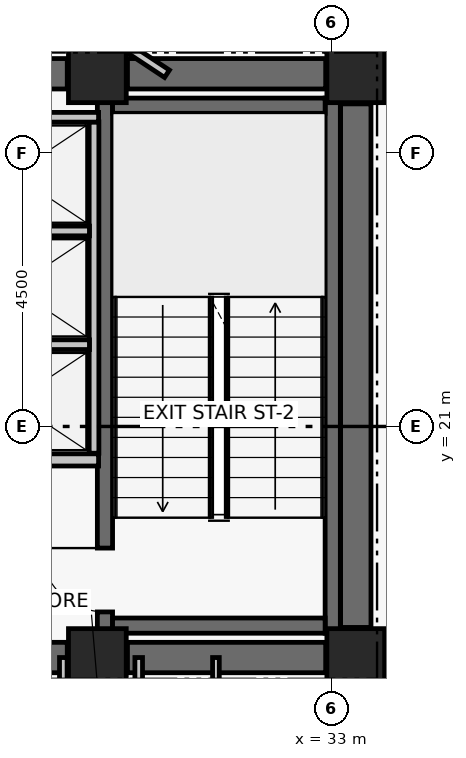
"""IFC4 building model, lengths in metres.
Left out: names, types, materials, properties, quantities, classifications, styles, units other than length and angle.
Written with IfcOpenShell. Run it as: python <this file> out.ifc"""

import sys

from ifc_helpers import new_model, si_unit, direction, frame, frame_2d, origin, origin_2d, place, context, subcontext, project, spatial, rectangle, extrude, element, fill, save


model = new_model("IFC4")
c1 = context("Model", 3, precision=1e-05, world=origin(), true_north=direction((0.0, 1.0)))
c2 = subcontext(c1, "Body", "Model", "MODEL_VIEW")
j1 = project(units=[si_unit("LENGTHUNIT", "METRE"), si_unit("PLANEANGLEUNIT", "RADIAN")], contexts=[c1])
p1 = place(None, origin())
s1 = spatial("IfcSite", under=j1, at=p1, CompositionType="ELEMENT")
p2 = place(p1, origin())
s2 = spatial("IfcBuilding", under=s1, at=p2, CompositionType="ELEMENT")
p3 = place(p2, frame((0.0, 0.0, 195.24)))
s3 = spatial("IfcBuildingStorey", under=s2, at=p3, CompositionType="ELEMENT", Elevation=195.24)
for number, where, z_axis, x_axis in (
    (1, (29.15, 17.2, 0.0), (0.0, 0.0, 1.0), (1.0, 0.0, 0.0)),
    (2, (33.4, 17.2, 0.0), (0.0, 0.0, 1.0), (1.0, 0.0, 0.0)),
    (3, (29.15, 26.8, 0.0), (0.0, 0.0, 1.0), (1.0, 0.0, 0.0)),
    (4, (33.4, 26.8, 0.0), (0.0, 0.0, 1.0), (1.0, 0.0, 0.0)),
):
    element("IfcColumn", number, at=place(p3, frame(where, z_axis=z_axis, x_axis=x_axis)), inside=s3, PredefinedType="COLUMN", context=c2, shape_type="SweptSolid", body=[
        extrude(rectangle(XDim=0.95, YDim=0.95, at=origin_2d()), origin(), (0.0, 0.0, 1.0), 3.72),
    ])
p4 = place(p3, frame((26.85, 17.2, 0.0), z_axis=(0.0, 0.0, 1.0), x_axis=(1.0, 0.0, 0.0)))
e5 = element("IfcWall", 5, at=p4, inside=s3, PredefinedType="SHEAR", context=c2, shape_type="SweptSolid", body=[
    extrude(rectangle(XDim=1.805, YDim=0.5, at=frame_2d((0.902, 0.0))), origin(), (0.0, 0.0, 1.0), 3.5),
])
p5 = place(p3, frame((29.645, 17.2, 0.0), z_axis=(0.0, 0.0, 1.0), x_axis=(1.0, 0.0, 0.0)))
e6 = element("IfcWall", 6, at=p5, inside=s3, PredefinedType="SHEAR", context=c2, shape_type="SweptSolid", body=[
    extrude(rectangle(XDim=3.26, YDim=0.5, at=frame_2d((1.63, 0.0))), origin(), (0.0, 0.0, 1.0), 3.5),
])
p6 = place(p3, frame((26.85, 26.8, 0.0), z_axis=(0.0, 0.0, 1.0), x_axis=(1.0, 0.0, 0.0)))
e7 = element("IfcWall", 7, at=p6, inside=s3, PredefinedType="SHEAR", context=c2, shape_type="SweptSolid", body=[
    extrude(rectangle(XDim=1.805, YDim=0.5, at=frame_2d((0.902, 0.0))), origin(), (0.0, 0.0, 1.0), 3.5),
])
p7 = place(p3, frame((29.645, 26.8, 0.0), z_axis=(0.0, 0.0, 1.0), x_axis=(1.0, 0.0, 0.0)))
e8 = element("IfcWall", 8, at=p7, inside=s3, PredefinedType="SHEAR", context=c2, shape_type="SweptSolid", body=[
    extrude(rectangle(XDim=3.26, YDim=0.5, at=frame_2d((1.63, 0.0))), origin(), (0.0, 0.0, 1.0), 3.5),
])
p8 = place(p3, frame((33.4, 17.695, 0.0), z_axis=(0.0, 0.0, 1.0), x_axis=(0.0, 1.0, 0.0)))
e9 = element("IfcWall", 9, at=p8, inside=s3, PredefinedType="SHEAR", context=c2, shape_type="SweptSolid", body=[
    extrude(rectangle(XDim=8.61, YDim=0.5, at=frame_2d((4.305, 0.0))), origin(), (0.0, 0.0, 1.0), 3.5),
])
p9 = place(p3, frame((29.275, 17.6, 0.0), z_axis=(0.0, 0.0, 1.0), x_axis=(0.0, 1.0, 0.0)))
e10 = element("IfcWall", 10, at=p9, inside=s3, PredefinedType="SHEAR", context=c2, shape_type="SweptSolid", body=[
    extrude(rectangle(XDim=8.8, YDim=0.25, at=frame_2d((4.4, 0.0))), origin(), (0.0, 0.0, 1.0), 3.5),
])
p10 = place(p9, frame((0.35, 0.0, 0.0)))
e11 = element("IfcOpeningElement", 11, at=p10, cuts=e10, PredefinedType="OPENING", context=c2, shape_type="SweptSolid", body=[
    extrude(rectangle(XDim=1.05, YDim=2.08, at=frame_2d((0.525, 1.04))), frame((0.0, 0.135, 0.0), z_axis=(0.0, -1.0, 0.0), x_axis=(1.0, 0.0, 0.0)), (0.0, 0.0, 1.0), 0.27),
])
p11 = place(p3, frame((33.021, 17.6, 0.0), z_axis=(0.0, 0.0, 1.0), x_axis=(0.0, 1.0, 0.0)))
e12 = element("IfcWall", 12, at=p11, inside=s3, PredefinedType="SHEAR", context=c2, shape_type="SweptSolid", body=[
    extrude(rectangle(XDim=8.8, YDim=0.25, at=frame_2d((4.4, 0.0))), origin(), (0.0, 0.0, 1.0), 3.5),
])
for number, where, z_axis, x_axis in (
    (13, (29.4, 17.725, 0.0), (0.0, 0.0, 1.0), (1.0, 0.0, 0.0)),
    (14, (29.4, 26.275, 0.0), (0.0, 0.0, 1.0), (1.0, 0.0, 0.0)),
):
    element("IfcWall", number, at=place(p3, frame(where, z_axis=z_axis, x_axis=x_axis)), inside=s3, PredefinedType="SHEAR", context=c2, shape_type="SweptSolid", body=[
        extrude(rectangle(XDim=3.496, YDim=0.25, at=frame_2d((1.748, 0.0))), origin(), (0.0, 0.0, 1.0), 3.5),
    ])
p12 = place(p3, frame((33.914, 26.649, 0.0), z_axis=(0.0, 0.0, 1.0), x_axis=(0.834259642914, -0.55137178764, 0.0)))
e15 = element("IfcWall", 15, at=p12, inside=s3, PredefinedType="PARTITIONING", context=c2, shape_type="SweptSolid", body=[
    extrude(rectangle(XDim=3.763, YDim=0.26, at=frame_2d((1.881, 0.0))), origin(), (0.0, 0.0, 1.0), 2.93),
])
p13 = place(p3, frame((26.37, 20.45, 0.0), z_axis=(0.0, 0.0, 1.0), x_axis=(1.0, 0.0, 0.0)))
e16 = element("IfcWall", 16, at=p13, inside=s3, PredefinedType="PARTITIONING", context=c2, shape_type="SweptSolid", body=[
    extrude(rectangle(XDim=2.8, YDim=0.2, at=frame_2d((1.4, 0.0))), origin(), (0.0, 0.0, 1.0), 3.5),
])
p14 = place(p13, frame((0.78, 0.0, 0.0)))
e17 = element("IfcOpeningElement", 17, at=p14, cuts=e16, PredefinedType="OPENING", context=c2, shape_type="SweptSolid", body=[
    extrude(rectangle(XDim=1.1, YDim=2.08, at=frame_2d((0.55, 1.04))), frame((0.0, 0.11, 0.0), z_axis=(0.0, -1.0, 0.0), x_axis=(1.0, 0.0, 0.0)), (0.0, 0.0, 1.0), 0.22),
])
p15 = place(p3, frame((29.095, 20.56, 0.0), z_axis=(0.0, 0.0, 1.0), x_axis=(0.0, 1.0, 0.0)))
e18 = element("IfcWall", 18, at=p15, inside=s3, PredefinedType="PARTITIONING", context=c2, shape_type="SweptSolid", body=[
    extrude(rectangle(XDim=5.45, YDim=0.16, at=frame_2d((2.725, 0.0))), origin(), (0.0, 0.0, 1.0), 3.5),
])
p16 = place(p3, frame((26.37, 22.345, 0.0), z_axis=(0.0, 0.0, 1.0), x_axis=(1.0, 0.0, 0.0)))
e19 = element("IfcWall", 19, at=p16, inside=s3, PredefinedType="PARTITIONING", context=c2, shape_type="SweptSolid", body=[
    extrude(rectangle(XDim=2.65, YDim=0.16, at=frame_2d((1.325, 0.0))), origin(), (0.0, 0.0, 1.0), 3.5),
])
p17 = place(p3, frame((26.53, 24.215, 0.0), z_axis=(0.0, 0.0, 1.0), x_axis=(1.0, 0.0, 0.0)))
e20 = element("IfcWall", 20, at=p17, inside=s3, PredefinedType="PARTITIONING", context=c2, shape_type="SweptSolid", body=[
    extrude(rectangle(XDim=2.49, YDim=0.16, at=frame_2d((1.245, 0.0))), origin(), (0.0, 0.0, 1.0), 3.5),
])
p18 = place(p3, frame((26.34, 26.085, 0.0), z_axis=(0.0, 0.0, 1.0), x_axis=(1.0, 0.0, 0.0)))
e21 = element("IfcWall", 21, at=p18, inside=s3, PredefinedType="PARTITIONING", context=c2, shape_type="SweptSolid", body=[
    extrude(rectangle(XDim=2.83, YDim=0.16, at=frame_2d((1.415, 0.0))), origin(), (0.0, 0.0, 1.0), 3.5),
])
for number, where, z_axis, x_axis in (
    (22, (28.59, 14.95, 0.0), (0.0, 0.0, 1.0), (0.0, 1.0, 0.0)),
    (23, (29.83, 14.95, 0.0), (0.0, 0.0, 1.0), (0.0, 1.0, 0.0)),
):
    element("IfcWall", number, at=place(p3, frame(where, z_axis=z_axis, x_axis=x_axis)), inside=s3, PredefinedType="PARTITIONING", context=c2, shape_type="SweptSolid", body=[
        extrude(rectangle(XDim=2.25, YDim=0.125, at=frame_2d((1.125, 0.0))), origin(), (0.0, 0.0, 1.0), 2.63),
    ])
p19 = place(p3, frame((31.1, 14.95, 0.0), z_axis=(0.0, 0.0, 1.0), x_axis=(0.0, 1.0, 0.0)))
e24 = element("IfcWall", 24, at=p19, inside=s3, PredefinedType="PARTITIONING", context=c2, shape_type="SweptSolid", body=[
    extrude(rectangle(XDim=2.25, YDim=0.11, at=frame_2d((1.125, 0.0))), origin(), (0.0, 0.0, 1.0), 2.63),
])
p20 = place(p3, frame((30.295, 26.8, 0.0), z_axis=(0.0, 0.0, 1.0), x_axis=(-0.834281274053, 0.551339056992, 0.0)))
e25 = element("IfcWall", 25, at=p20, inside=s3, PredefinedType="PARTITIONING", context=c2, shape_type="SweptSolid", body=[
    extrude(rectangle(XDim=2.115, YDim=0.145, at=frame_2d((1.058, 0.0))), origin(), (0.0, 0.0, 1.0), 2.63),
])
p21 = place(p10, origin())
e26 = element("IfcDoor", 26, at=p21, inside=s3, OperationType="SINGLE_SWING_RIGHT", PredefinedType="DOOR", context=c2, shape_type="SweptSolid", body=[
    extrude(rectangle(XDim=1.05, YDim=2.08, at=frame_2d((0.525, 1.04))), frame((0.0, 0.025, 0.0), z_axis=(0.0, -1.0, 0.0), x_axis=(1.0, 0.0, 0.0)), (0.0, 0.0, 1.0), 0.05),
])
fill(e11, e26)
save(model, sys.argv[1])
